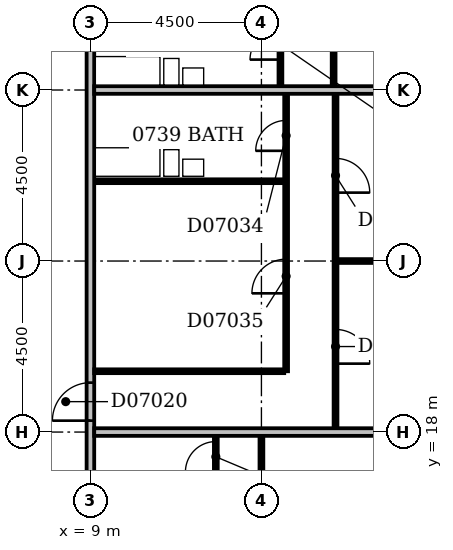
"""IFC4 building model, lengths in metres.
Left out: names, types, materials, properties, quantities, classifications, styles, units other than length and angle.
Written with IfcOpenShell. Run it as: python <this file> out.ifc"""

import sys

from ifc_helpers import new_model, si_unit, direction, frame, frame_2d, origin, place, context, subcontext, project, spatial, rectangle, extrude, element, fill, save


model = new_model("IFC4")
c1 = context("Model", 3, precision=1e-05, world=origin(), true_north=direction((0.0, 1.0)))
c2 = subcontext(c1, "Body", "Model", "MODEL_VIEW")
j1 = project(units=[si_unit("LENGTHUNIT", "METRE"), si_unit("PLANEANGLEUNIT", "RADIAN")], contexts=[c1])
p1 = place(None, origin())
s1 = spatial("IfcSite", under=j1, at=p1, CompositionType="ELEMENT")
p2 = place(p1, origin())
s2 = spatial("IfcBuilding", under=s1, at=p2, CompositionType="ELEMENT")
p3 = place(p2, frame((0.0, 0.0, 36.2)))
s3 = spatial("IfcBuildingStorey", under=s2, at=p3, CompositionType="ELEMENT", Elevation=36.2)
p4 = place(p3, frame((9.0, 5.0, 0.0), z_axis=(0.0, 0.0, 1.0), x_axis=(0.0, 1.0, 0.0)))
e1 = element("IfcWall", 1, at=p4, inside=s3, PredefinedType="PARTITIONING", context=c2, shape_type="SweptSolid", body=[
    extrude(rectangle(XDim=44.5, YDim=0.2, at=frame_2d((22.25, 0.0))), origin(), (0.0, 0.0, 1.0), 3.3),
])
p5 = place(p4, frame((24.7, 0.0, 0.0)))
e2 = element("IfcOpeningElement", 2, at=p5, cuts=e1, PredefinedType="OPENING", context=c2, shape_type="SweptSolid", body=[
    extrude(rectangle(XDim=1.0, YDim=2.1, at=frame_2d((0.5, 1.05))), frame((0.0, 0.112, 0.0), z_axis=(0.0, -1.0, 0.0), x_axis=(1.0, 0.0, 0.0)), (0.0, 0.0, 1.0), 0.224),
])
p6 = place(p4, frame((13.3, 0.0, 0.0)))
e3 = element("IfcOpeningElement", 3, at=p6, cuts=e1, PredefinedType="OPENING", context=c2, shape_type="SweptSolid", body=[
    extrude(rectangle(XDim=1.0, YDim=2.1, at=frame_2d((0.5, 1.05))), frame((0.0, 0.112, 0.0), z_axis=(0.0, -1.0, 0.0), x_axis=(1.0, 0.0, 0.0)), (0.0, 0.0, 1.0), 0.224),
])
p7 = place(p4, frame((10.45, 0.0, 0.0)))
e4 = element("IfcOpeningElement", 4, at=p7, cuts=e1, PredefinedType="OPENING", context=c2, shape_type="SweptSolid", body=[
    extrude(rectangle(XDim=1.0, YDim=2.1, at=frame_2d((0.5, 1.05))), frame((0.0, 0.112, 0.0), z_axis=(0.0, -1.0, 0.0), x_axis=(1.0, 0.0, 0.0)), (0.0, 0.0, 1.0), 0.224),
])
p8 = place(p4, frame((5.95, 0.0, 0.0)))
e5 = element("IfcOpeningElement", 5, at=p8, cuts=e1, PredefinedType="OPENING", context=c2, shape_type="SweptSolid", body=[
    extrude(rectangle(XDim=1.0, YDim=2.1, at=frame_2d((0.5, 1.05))), frame((0.0, 0.112, 0.0), z_axis=(0.0, -1.0, 0.0), x_axis=(1.0, 0.0, 0.0)), (0.0, 0.0, 1.0), 0.224),
])
p9 = place(p4, frame((37.25, 0.0, 0.0)))
e6 = element("IfcOpeningElement", 6, at=p9, cuts=e1, PredefinedType="OPENING", context=c2, shape_type="SweptSolid", body=[
    extrude(rectangle(XDim=0.9, YDim=2.1, at=frame_2d((0.45, 1.05))), frame((0.0, 0.112, 0.0), z_axis=(0.0, -1.0, 0.0), x_axis=(1.0, 0.0, 0.0)), (0.0, 0.0, 1.0), 0.224),
])
p10 = place(p4, frame((1.5, 0.0, 0.0)))
e7 = element("IfcOpeningElement", 7, at=p10, cuts=e1, PredefinedType="OPENING", context=c2, shape_type="SweptSolid", body=[
    extrude(rectangle(XDim=0.9, YDim=2.1, at=frame_2d((0.45, 1.05))), frame((0.0, 0.112, 0.0), z_axis=(0.0, -1.0, 0.0), x_axis=(1.0, 0.0, 0.0)), (0.0, 0.0, 1.0), 0.224),
])
p11 = place(p3, frame((13.5, 9.6, 0.0), z_axis=(0.0, 0.0, 1.0), x_axis=(0.0, 1.0, 0.0)))
e8 = element("IfcWall", 8, at=p11, inside=s3, PredefinedType="PARTITIONING", context=c2, shape_type="SweptSolid", body=[
    extrude(rectangle(XDim=8.3, YDim=0.1, at=frame_2d((4.15, 0.0))), origin(), (0.0, 0.0, 1.0), 3.3),
])
p12 = place(p11, frame((5.7, 0.0, 0.0)))
e9 = element("IfcOpeningElement", 9, at=p12, cuts=e8, PredefinedType="OPENING", context=c2, shape_type="SweptSolid", body=[
    extrude(rectangle(XDim=0.9, YDim=2.1, at=frame_2d((0.45, 1.05))), frame((0.0, 0.062, 0.0), z_axis=(0.0, -1.0, 0.0), x_axis=(1.0, 0.0, 0.0)), (0.0, 0.0, 1.0), 0.124),
])
p13 = place(p11, frame((1.2, 0.0, 0.0)))
e10 = element("IfcOpeningElement", 10, at=p13, cuts=e8, PredefinedType="OPENING", context=c2, shape_type="SweptSolid", body=[
    extrude(rectangle(XDim=0.9, YDim=2.1, at=frame_2d((0.45, 1.05))), frame((0.0, 0.062, 0.0), z_axis=(0.0, -1.0, 0.0), x_axis=(1.0, 0.0, 0.0)), (0.0, 0.0, 1.0), 0.124),
])
p14 = place(p3, frame((12.3, 16.7, 0.0), z_axis=(0.0, 0.0, 1.0), x_axis=(0.0, 1.0, 0.0)))
e11 = element("IfcWall", 11, at=p14, inside=s3, PredefinedType="PARTITIONING", context=c2, shape_type="SweptSolid", body=[
    extrude(rectangle(XDim=1.2, YDim=0.1, at=frame_2d((0.6, 0.0))), origin(), (0.0, 0.0, 1.0), 3.3),
])
p15 = place(p14, frame((0.25, 0.0, 0.0)))
e12 = element("IfcOpeningElement", 12, at=p15, cuts=e11, PredefinedType="OPENING", context=c2, shape_type="SweptSolid", body=[
    extrude(rectangle(XDim=0.8, YDim=2.1, at=frame_2d((0.4, 1.05))), frame((0.0, 0.062, 0.0), z_axis=(0.0, -1.0, 0.0), x_axis=(1.0, 0.0, 0.0)), (0.0, 0.0, 1.0), 0.124),
])
p16 = place(p3, frame((9.1, 18.0, 0.0), z_axis=(0.0, 0.0, 1.0), x_axis=(1.0, 0.0, 0.0)))
e13 = element("IfcWall", 13, at=p16, inside=s3, PredefinedType="PARTITIONING", context=c2, shape_type="SweptSolid", body=[
    extrude(rectangle(XDim=8.3, YDim=0.2, at=frame_2d((4.15, 0.0))), origin(), (0.0, 0.0, 1.0), 2.6),
])
p17 = place(p3, frame((15.45, 18.1, 0.0), z_axis=(0.0, 0.0, 1.0), x_axis=(0.0, 1.0, 0.0)))
e14 = element("IfcWall", 14, at=p17, inside=s3, PredefinedType="PARTITIONING", context=c2, shape_type="SweptSolid", body=[
    extrude(rectangle(XDim=8.8, YDim=0.1, at=frame_2d((4.4, 0.0))), origin(), (0.0, 0.0, 1.0), 3.3),
])
p18 = place(p17, frame((1.7, 0.0, 0.0)))
e15 = element("IfcOpeningElement", 15, at=p18, cuts=e14, PredefinedType="OPENING", context=c2, shape_type="SweptSolid", body=[
    extrude(rectangle(XDim=0.9, YDim=2.1, at=frame_2d((0.45, 1.05))), frame((0.0, 0.062, 0.0), z_axis=(0.0, -1.0, 0.0), x_axis=(1.0, 0.0, 0.0)), (0.0, 0.0, 1.0), 0.124),
])
p19 = place(p17, frame((6.2, 0.0, 0.0)))
e16 = element("IfcOpeningElement", 16, at=p19, cuts=e14, PredefinedType="OPENING", context=c2, shape_type="SweptSolid", body=[
    extrude(rectangle(XDim=0.9, YDim=2.1, at=frame_2d((0.45, 1.05))), frame((0.0, 0.062, 0.0), z_axis=(0.0, -1.0, 0.0), x_axis=(1.0, 0.0, 0.0)), (0.0, 0.0, 1.0), 0.124),
])
p20 = place(p3, frame((9.1, 19.6, 0.0), z_axis=(0.0, 0.0, 1.0), x_axis=(1.0, 0.0, 0.0)))
e17 = element("IfcWall", 17, at=p20, inside=s3, PredefinedType="PARTITIONING", context=c2, shape_type="SweptSolid", body=[
    extrude(rectangle(XDim=5.0, YDim=0.1, at=frame_2d((2.5, 0.0))), origin(), (0.0, 0.0, 1.0), 3.3),
])
p21 = place(p3, frame((14.15, 19.6, 0.0), z_axis=(0.0, 0.0, 1.0), x_axis=(0.0, 1.0, 0.0)))
e18 = element("IfcWall", 18, at=p21, inside=s3, PredefinedType="PARTITIONING", context=c2, shape_type="SweptSolid", body=[
    extrude(rectangle(XDim=7.3, YDim=0.1, at=frame_2d((3.65, 0.0))), origin(), (0.0, 0.0, 1.0), 3.3),
])
p22 = place(p21, frame((5.8, 0.0, 0.0)))
e19 = element("IfcOpeningElement", 19, at=p22, cuts=e18, PredefinedType="OPENING", context=c2, shape_type="SweptSolid", body=[
    extrude(rectangle(XDim=0.8, YDim=2.1, at=frame_2d((0.4, 1.05))), frame((0.0, 0.062, 0.0), z_axis=(0.0, -1.0, 0.0), x_axis=(1.0, 0.0, 0.0)), (0.0, 0.0, 1.0), 0.124),
])
p23 = place(p21, frame((2.05, 0.0, 0.0)))
e20 = element("IfcOpeningElement", 20, at=p23, cuts=e18, PredefinedType="OPENING", context=c2, shape_type="SweptSolid", body=[
    extrude(rectangle(XDim=0.9, YDim=2.1, at=frame_2d((0.45, 1.05))), frame((0.0, 0.062, 0.0), z_axis=(0.0, -1.0, 0.0), x_axis=(1.0, 0.0, 0.0)), (0.0, 0.0, 1.0), 0.124),
])
p24 = place(p3, frame((15.5, 22.5, 0.0), z_axis=(0.0, 0.0, 1.0), x_axis=(1.0, 0.0, 0.0)))
e21 = element("IfcWall", 21, at=p24, inside=s3, PredefinedType="PARTITIONING", context=c2, shape_type="SweptSolid", body=[
    extrude(rectangle(XDim=6.4, YDim=0.1, at=frame_2d((3.2, 0.0))), origin(), (0.0, 0.0, 1.0), 3.3),
])
p25 = place(p3, frame((9.1, 24.6, 0.0), z_axis=(0.0, 0.0, 1.0), x_axis=(1.0, 0.0, 0.0)))
e22 = element("IfcWall", 22, at=p25, inside=s3, PredefinedType="PLUMBINGWALL", context=c2, shape_type="SweptSolid", body=[
    extrude(rectangle(XDim=5.0, YDim=0.1, at=frame_2d((2.5, 0.0))), origin(), (0.0, 0.0, 1.0), 3.3),
])
p26 = place(p3, frame((9.1, 27.0, 0.0), z_axis=(0.0, 0.0, 1.0), x_axis=(1.0, 0.0, 0.0)))
e23 = element("IfcWall", 23, at=p26, inside=s3, PredefinedType="PARTITIONING", context=c2, shape_type="SweptSolid", body=[
    extrude(rectangle(XDim=12.8, YDim=0.2, at=frame_2d((6.4, 0.0))), origin(), (0.0, 0.0, 1.0), 2.7),
])
p27 = place(p3, frame((14.0, 27.1, 0.0), z_axis=(0.0, 0.0, 1.0), x_axis=(0.0, 1.0, 0.0)))
e24 = element("IfcWall", 24, at=p27, inside=s3, PredefinedType="PARTITIONING", context=c2, shape_type="SweptSolid", body=[
    extrude(rectangle(XDim=2.3, YDim=0.1, at=frame_2d((1.15, 0.0))), origin(), (0.0, 0.0, 1.0), 3.3),
])
p28 = place(p27, frame((0.7, 0.0, 0.0)))
e25 = element("IfcOpeningElement", 25, at=p28, cuts=e24, PredefinedType="OPENING", context=c2, shape_type="SweptSolid", body=[
    extrude(rectangle(XDim=0.8, YDim=2.1, at=frame_2d((0.4, 1.05))), frame((0.0, 0.062, 0.0), z_axis=(0.0, -1.0, 0.0), x_axis=(1.0, 0.0, 0.0)), (0.0, 0.0, 1.0), 0.124),
])
p29 = place(p3, frame((15.4, 27.1, 0.0), z_axis=(0.0, 0.0, 1.0), x_axis=(0.0, 1.0, 0.0)))
e26 = element("IfcWall", 26, at=p29, inside=s3, PredefinedType="PARTITIONING", context=c2, shape_type="SweptSolid", body=[
    extrude(rectangle(XDim=8.8, YDim=0.1, at=frame_2d((4.4, 0.0))), origin(), (0.0, 0.0, 1.0), 3.3),
])
p30 = place(p29, frame((1.7, 0.0, 0.0)))
e27 = element("IfcOpeningElement", 27, at=p30, cuts=e26, PredefinedType="OPENING", context=c2, shape_type="SweptSolid", body=[
    extrude(rectangle(XDim=0.9, YDim=2.1, at=frame_2d((0.45, 1.05))), frame((0.0, 0.062, 0.0), z_axis=(0.0, -1.0, 0.0), x_axis=(1.0, 0.0, 0.0)), (0.0, 0.0, 1.0), 0.124),
])
p31 = place(p29, frame((6.2, 0.0, 0.0)))
e28 = element("IfcOpeningElement", 28, at=p31, cuts=e26, PredefinedType="OPENING", context=c2, shape_type="SweptSolid", body=[
    extrude(rectangle(XDim=0.9, YDim=2.1, at=frame_2d((0.45, 1.05))), frame((0.0, 0.062, 0.0), z_axis=(0.0, -1.0, 0.0), x_axis=(1.0, 0.0, 0.0)), (0.0, 0.0, 1.0), 0.124),
])
p32 = place(p6, origin())
e29 = element("IfcDoor", 29, at=p32, inside=s3, OperationType="SINGLE_SWING_LEFT", PredefinedType="DOOR", context=c2, shape_type="SweptSolid", body=[
    extrude(rectangle(XDim=1.0, YDim=2.1, at=frame_2d((0.5, 1.05))), frame((0.0, 0.025, 0.0), z_axis=(0.0, -1.0, 0.0), x_axis=(1.0, 0.0, 0.0)), (0.0, 0.0, 1.0), 0.05),
])
fill(e3, e29)
p33 = place(p15, origin())
e30 = element("IfcDoor", 30, at=p33, inside=s3, OperationType="SINGLE_SWING_LEFT", PredefinedType="DOOR", context=c2, shape_type="SweptSolid", body=[
    extrude(rectangle(XDim=0.8, YDim=2.1, at=frame_2d((0.4, 1.05))), frame((0.0, 0.025, 0.0), z_axis=(0.0, -1.0, 0.0), x_axis=(1.0, 0.0, 0.0)), (0.0, 0.0, 1.0), 0.05),
])
fill(e12, e30)
p34 = place(p18, frame((0.9, 0.0, 0.0), z_axis=(0.0, 0.0, 1.0), x_axis=(-1.0, 0.0, 0.0)))
e31 = element("IfcDoor", 31, at=p34, inside=s3, OperationType="SINGLE_SWING_RIGHT", PredefinedType="DOOR", context=c2, shape_type="SweptSolid", body=[
    extrude(rectangle(XDim=0.9, YDim=2.1, at=frame_2d((0.45, 1.05))), frame((0.0, 0.025, 0.0), z_axis=(0.0, -1.0, 0.0), x_axis=(1.0, 0.0, 0.0)), (0.0, 0.0, 1.0), 0.05),
])
fill(e15, e31)
p35 = place(p19, frame((0.9, 0.0, 0.0), z_axis=(0.0, 0.0, 1.0), x_axis=(-1.0, 0.0, 0.0)))
e32 = element("IfcDoor", 32, at=p35, inside=s3, OperationType="SINGLE_SWING_RIGHT", PredefinedType="DOOR", context=c2, shape_type="SweptSolid", body=[
    extrude(rectangle(XDim=0.9, YDim=2.1, at=frame_2d((0.45, 1.05))), frame((0.0, 0.025, 0.0), z_axis=(0.0, -1.0, 0.0), x_axis=(1.0, 0.0, 0.0)), (0.0, 0.0, 1.0), 0.05),
])
fill(e16, e32)
p36 = place(p22, origin())
e33 = element("IfcDoor", 33, at=p36, inside=s3, OperationType="SINGLE_SWING_LEFT", PredefinedType="DOOR", context=c2, shape_type="SweptSolid", body=[
    extrude(rectangle(XDim=0.8, YDim=2.1, at=frame_2d((0.4, 1.05))), frame((0.0, 0.025, 0.0), z_axis=(0.0, -1.0, 0.0), x_axis=(1.0, 0.0, 0.0)), (0.0, 0.0, 1.0), 0.05),
])
fill(e19, e33)
p37 = place(p23, origin())
e34 = element("IfcDoor", 34, at=p37, inside=s3, OperationType="SINGLE_SWING_LEFT", PredefinedType="DOOR", context=c2, shape_type="SweptSolid", body=[
    extrude(rectangle(XDim=0.9, YDim=2.1, at=frame_2d((0.45, 1.05))), frame((0.0, 0.025, 0.0), z_axis=(0.0, -1.0, 0.0), x_axis=(1.0, 0.0, 0.0)), (0.0, 0.0, 1.0), 0.05),
])
fill(e20, e34)
p38 = place(p28, origin())
e35 = element("IfcDoor", 35, at=p38, inside=s3, OperationType="SINGLE_SWING_LEFT", PredefinedType="DOOR", context=c2, shape_type="SweptSolid", body=[
    extrude(rectangle(XDim=0.8, YDim=2.1, at=frame_2d((0.4, 1.05))), frame((0.0, 0.025, 0.0), z_axis=(0.0, -1.0, 0.0), x_axis=(1.0, 0.0, 0.0)), (0.0, 0.0, 1.0), 0.05),
])
fill(e25, e35)
save(model, sys.argv[1])
